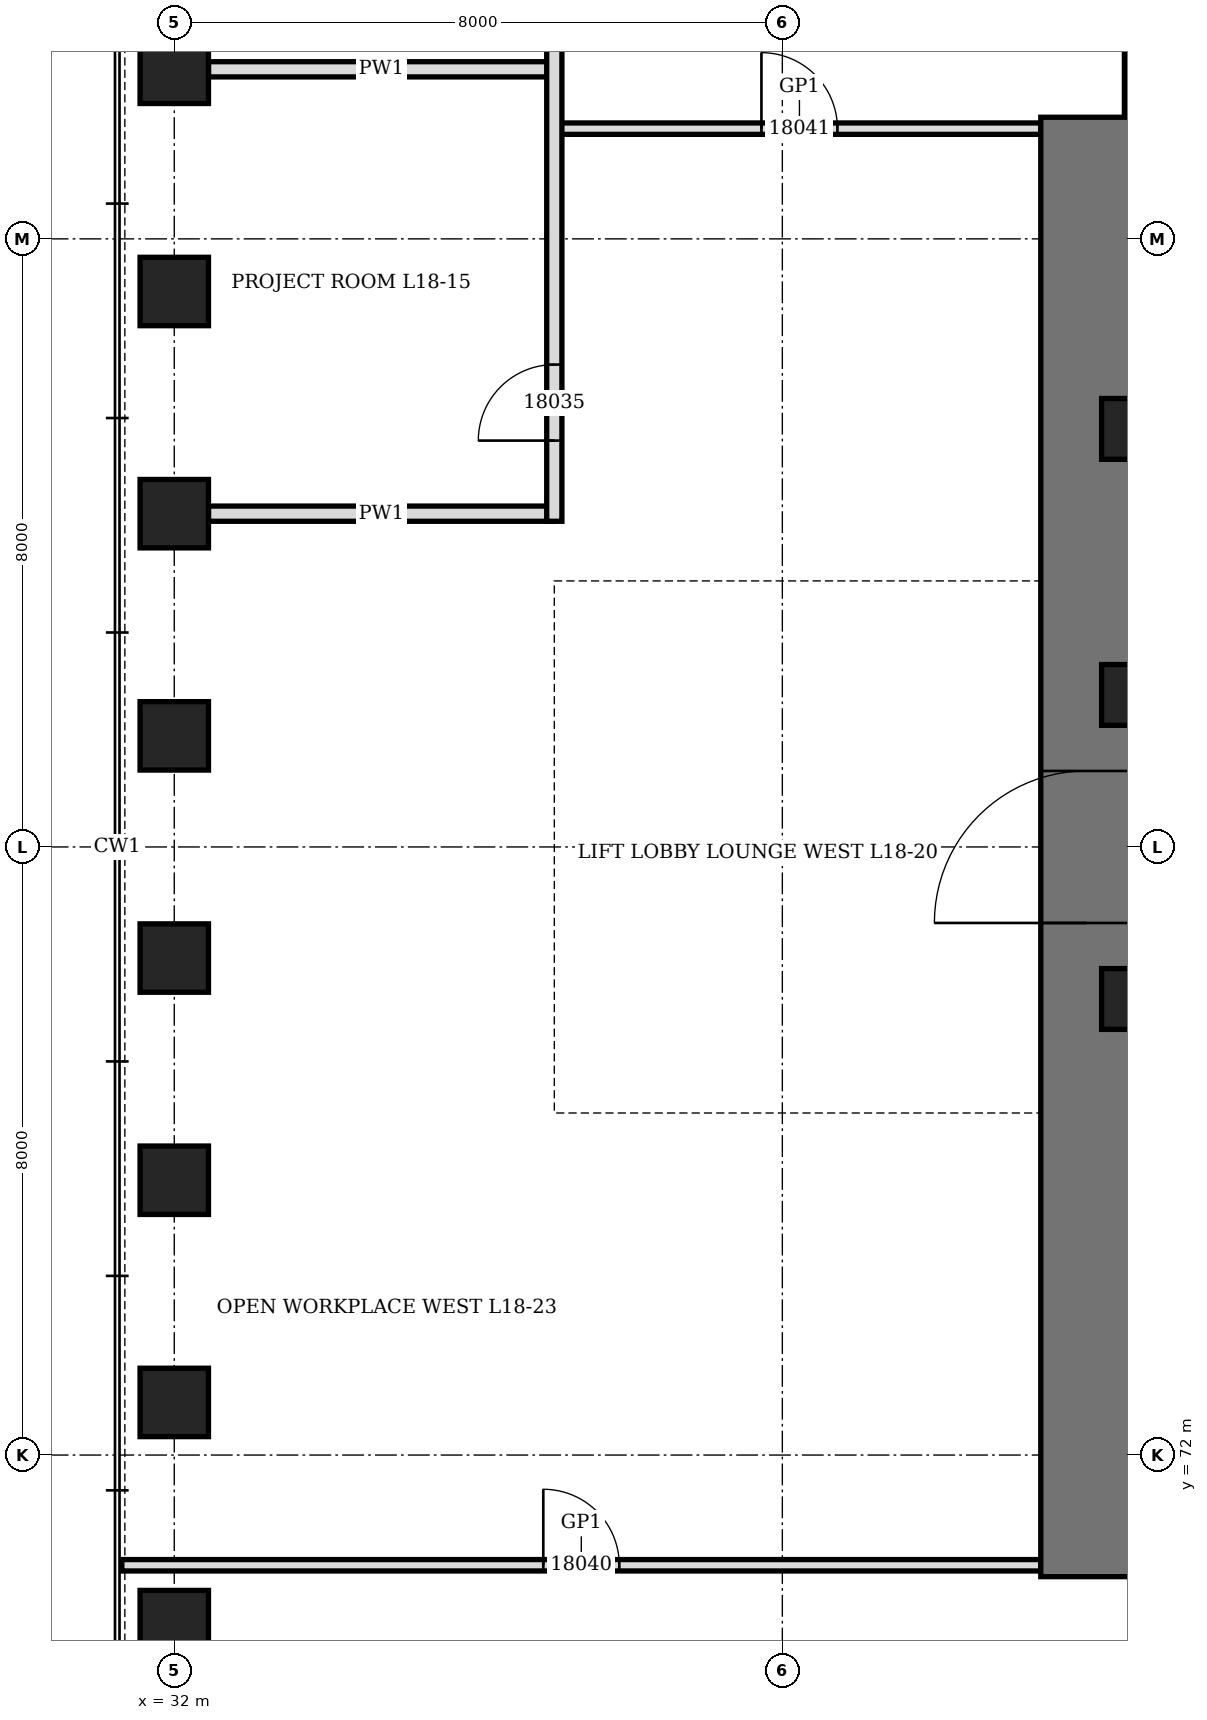
"""IFC4 building model, lengths in metres.
Left out: names, types, materials, properties, quantities, classifications, styles, units other than length and angle.
Written with IfcOpenShell. Run it as: python <this file> out.ifc"""

import sys

from ifc_helpers import new_model, si_unit, direction, frame, frame_2d, origin, origin_2d, place, context, subcontext, project, spatial, rectangle, hollow_rectangle, extrude, element, fill, save


model = new_model("IFC4")
c1 = context("Model", 3, precision=1e-05, world=origin(), true_north=direction((0.0, 1.0)))
c2 = subcontext(c1, "Body", "Model", "MODEL_VIEW")
j1 = project(units=[si_unit("LENGTHUNIT", "METRE"), si_unit("PLANEANGLEUNIT", "RADIAN")], contexts=[c1])
p1 = place(None, origin())
s1 = spatial("IfcSite", under=j1, at=p1, CompositionType="ELEMENT")
p2 = place(p1, origin())
s2 = spatial("IfcBuilding", under=s1, at=p2, CompositionType="ELEMENT")
p3 = place(p2, frame((0.0, 0.0, 85.3)))
s3 = spatial("IfcBuildingStorey", under=s2, at=p3, CompositionType="ELEMENT", Elevation=85.3)
for number, where, z_axis, x_axis in (
    (1, (32.0, 90.231, 0.0), (0.0, 0.0, 1.0), (0.0, 1.0, 0.0)),
    (2, (32.0, 87.308, 0.0), (0.0, 0.0, 1.0), (0.0, 1.0, 0.0)),
    (3, (32.0, 84.385, 0.0), (0.0, 0.0, 1.0), (0.0, 1.0, 0.0)),
    (4, (32.0, 81.461, 0.0), (0.0, 0.0, 1.0), (0.0, 1.0, 0.0)),
    (5, (32.0, 78.539, 0.0), (0.0, 0.0, 1.0), (0.0, 1.0, 0.0)),
    (6, (32.0, 75.615, 0.0), (0.0, 0.0, 1.0), (0.0, 1.0, 0.0)),
    (7, (32.0, 72.692, 0.0), (0.0, 0.0, 1.0), (0.0, 1.0, 0.0)),
    (8, (32.0, 69.769, 0.0), (0.0, 0.0, 1.0), (0.0, 1.0, 0.0)),
):
    element("IfcColumn", number, at=place(p3, frame(where, z_axis=z_axis, x_axis=x_axis)), inside=s3, PredefinedType="COLUMN", context=c2, shape_type="SweptSolid", body=[
        extrude(hollow_rectangle(XDim=0.9, YDim=0.9, WallThickness=0.12, at=origin_2d()), origin(), (0.0, 0.0, 1.0), 4.2),
    ])
p4 = place(p3, frame((44.0, 70.4, 0.0), z_axis=(0.0, 0.0, 1.0), x_axis=(0.0, 1.0, 0.0)))
e9 = element("IfcWall", 9, at=p4, inside=s3, PredefinedType="SHEAR", context=c2, shape_type="SweptSolid", body=[
    extrude(rectangle(XDim=19.2, YDim=1.2, at=frame_2d((9.6, 0.0))), origin(), (0.0, 0.0, 1.0), 4.2),
])
p5 = place(p4, frame((8.6, 0.0, 0.0)))
e10 = element("IfcOpeningElement", 10, at=p5, cuts=e9, PredefinedType="OPENING", context=c2, shape_type="SweptSolid", body=[
    extrude(rectangle(XDim=2.0, YDim=2.4, at=frame_2d((1.0, 1.2))), frame((0.0, 0.61, 0.0), z_axis=(0.0, -1.0, 0.0), x_axis=(1.0, 0.0, 0.0)), (0.0, 0.0, 1.0), 1.22),
])
for number, where, z_axis, x_axis in (
    (11, (44.6, 78.0, 0.0), (0.0, 0.0, 1.0), (1.0, 0.0, 0.0)),
    (12, (44.6, 82.0, 0.0), (0.0, 0.0, 1.0), (1.0, 0.0, 0.0)),
    (13, (44.6, 85.5, 0.0), (0.0, 0.0, 1.0), (1.0, 0.0, 0.0)),
):
    element("IfcColumn", number, at=place(p3, frame(where, z_axis=z_axis, x_axis=x_axis)), inside=s3, PredefinedType="COLUMN", context=c2, shape_type="SweptSolid", body=[
        extrude(hollow_rectangle(XDim=0.8, YDim=0.8, WallThickness=0.1, at=origin_2d()), origin(), (0.0, 0.0, 1.0), 4.2),
    ])
for number, where, z_axis, x_axis in (
    (14, (32.45, 84.385, 0.0), (0.0, 0.0, 1.0), (1.0, 0.0, 0.0)),
    (15, (32.45, 90.231, 0.0), (0.0, 0.0, 1.0), (1.0, 0.0, 0.0)),
):
    element("IfcWall", number, at=place(p3, frame(where, z_axis=z_axis, x_axis=x_axis)), inside=s3, PredefinedType="PARTITIONING", context=c2, shape_type="SweptSolid", body=[
        extrude(rectangle(XDim=4.55, YDim=0.2, at=frame_2d((2.275, 0.0))), origin(), (0.0, 0.0, 1.0), 3.428),
    ])
p6 = place(p3, frame((44.6, 89.6, 0.0), z_axis=(0.0, 0.0, 1.0), x_axis=(0.0, 1.0, 0.0)))
e16 = element("IfcWall", 16, at=p6, inside=s3, PredefinedType="PARTITIONING", context=c2, shape_type="SweptSolid", body=[
    extrude(rectangle(XDim=3.0, YDim=0.2, at=frame_2d((1.5, 0.0))), origin(), (0.0, 0.0, 1.0), 4.04),
])
p7 = place(p3, frame((31.31, 70.55, 0.0), z_axis=(0.0, 0.0, 1.0), x_axis=(1.0, 0.0, 0.0)))
e17 = element("IfcWall", 17, at=p7, inside=s3, PredefinedType="PARTITIONING", context=c2, shape_type="SweptSolid", body=[
    extrude(rectangle(XDim=12.09, YDim=0.15, at=frame_2d((6.045, 0.0))), origin(), (0.0, 0.0, 1.0), 4.04),
])
p8 = place(p7, frame((5.545, 0.0, 0.0)))
e18 = element("IfcOpeningElement", 18, at=p8, cuts=e17, PredefinedType="OPENING", context=c2, shape_type="SweptSolid", body=[
    extrude(rectangle(XDim=1.0, YDim=2.4, at=frame_2d((0.5, 1.2))), frame((0.0, 0.085, 0.0), z_axis=(0.0, -1.0, 0.0), x_axis=(1.0, 0.0, 0.0)), (0.0, 0.0, 1.0), 0.17),
])
p9 = place(p3, frame((37.05, 89.45, 0.0), z_axis=(0.0, 0.0, 1.0), x_axis=(1.0, 0.0, 0.0)))
e19 = element("IfcWall", 19, at=p9, inside=s3, PredefinedType="PARTITIONING", context=c2, shape_type="SweptSolid", body=[
    extrude(rectangle(XDim=6.35, YDim=0.15, at=frame_2d((3.175, 0.0))), origin(), (0.0, 0.0, 1.0), 4.04),
])
p10 = place(p9, frame((2.675, 0.0, 0.0)))
e20 = element("IfcOpeningElement", 20, at=p10, cuts=e19, PredefinedType="OPENING", context=c2, shape_type="SweptSolid", body=[
    extrude(rectangle(XDim=1.0, YDim=2.4, at=frame_2d((0.5, 1.2))), frame((0.0, 0.085, 0.0), z_axis=(0.0, -1.0, 0.0), x_axis=(1.0, 0.0, 0.0)), (0.0, 0.0, 1.0), 0.17),
])
p11 = place(p3, frame((37.0, 84.285, 0.0), z_axis=(0.0, 0.0, 1.0), x_axis=(0.0, 1.0, 0.0)))
e21 = element("IfcWall", 21, at=p11, inside=s3, PredefinedType="PARTITIONING", context=c2, shape_type="SweptSolid", body=[
    extrude(rectangle(XDim=14.265, YDim=0.2, at=frame_2d((7.133, 0.0))), origin(), (0.0, 0.0, 1.0), 4.04),
])
p12 = place(p11, frame((1.062, 0.0, 0.0)))
e22 = element("IfcOpeningElement", 22, at=p12, cuts=e21, PredefinedType="OPENING", context=c2, shape_type="SweptSolid", body=[
    extrude(rectangle(XDim=1.0, YDim=2.1, at=frame_2d((0.5, 1.05))), frame((0.0, 0.11, 0.0), z_axis=(0.0, -1.0, 0.0), x_axis=(1.0, 0.0, 0.0)), (0.0, 0.0, 1.0), 0.22),
])
p13 = place(p11, frame((6.908, 0.0, 0.0)))
e23 = element("IfcOpeningElement", 23, at=p13, cuts=e21, PredefinedType="OPENING", context=c2, shape_type="SweptSolid", body=[
    extrude(rectangle(XDim=1.0, YDim=2.1, at=frame_2d((0.5, 1.05))), frame((0.0, 0.11, 0.0), z_axis=(0.0, -1.0, 0.0), x_axis=(1.0, 0.0, 0.0)), (0.0, 0.0, 1.0), 0.22),
])
p14 = place(p11, frame((12.754, 0.0, 0.0)))
e24 = element("IfcOpeningElement", 24, at=p14, cuts=e21, PredefinedType="OPENING", context=c2, shape_type="SweptSolid", body=[
    extrude(rectangle(XDim=1.0, YDim=2.1, at=frame_2d((0.5, 1.05))), frame((0.0, 0.11, 0.0), z_axis=(0.0, -1.0, 0.0), x_axis=(1.0, 0.0, 0.0)), (0.0, 0.0, 1.0), 0.22),
])
p15 = place(p5, origin())
e25 = element("IfcDoor", 25, at=p15, inside=s3, OperationType="DOUBLE_DOOR_SINGLE_SWING", PredefinedType="DOOR", context=c2, shape_type="SweptSolid", body=[
    extrude(rectangle(XDim=2.0, YDim=2.4, at=frame_2d((1.0, 1.2))), frame((0.0, 0.35, 0.0), z_axis=(0.0, -1.0, 0.0), x_axis=(1.0, 0.0, 0.0)), (0.0, 0.0, 1.0), 0.7),
])
fill(e10, e25)
p16 = place(p12, origin())
e26 = element("IfcDoor", 26, at=p16, inside=s3, OperationType="SINGLE_SWING_LEFT", PredefinedType="DOOR", context=c2, shape_type="SweptSolid", body=[
    extrude(rectangle(XDim=1.0, YDim=2.1, at=frame_2d((0.5, 1.05))), frame((0.0, 0.1, 0.0), z_axis=(0.0, -1.0, 0.0), x_axis=(1.0, 0.0, 0.0)), (0.0, 0.0, 1.0), 0.199),
])
fill(e22, e26)
p17 = place(p8, origin())
e27 = element("IfcDoor", 27, at=p17, inside=s3, OperationType="SINGLE_SWING_RIGHT", PredefinedType="DOOR", context=c2, shape_type="SweptSolid", body=[
    extrude(rectangle(XDim=1.0, YDim=2.4, at=frame_2d((0.5, 1.2))), frame((0.0, 0.075, 0.0), z_axis=(0.0, -1.0, 0.0), x_axis=(1.0, 0.0, 0.0)), (0.0, 0.0, 1.0), 0.149),
])
fill(e18, e27)
p18 = place(p10, origin())
e28 = element("IfcDoor", 28, at=p18, inside=s3, OperationType="SINGLE_SWING_RIGHT", PredefinedType="DOOR", context=c2, shape_type="SweptSolid", body=[
    extrude(rectangle(XDim=1.0, YDim=2.4, at=frame_2d((0.5, 1.2))), frame((0.0, 0.075, 0.0), z_axis=(0.0, -1.0, 0.0), x_axis=(1.0, 0.0, 0.0)), (0.0, 0.0, 1.0), 0.149),
])
fill(e20, e28)
save(model, sys.argv[1])
